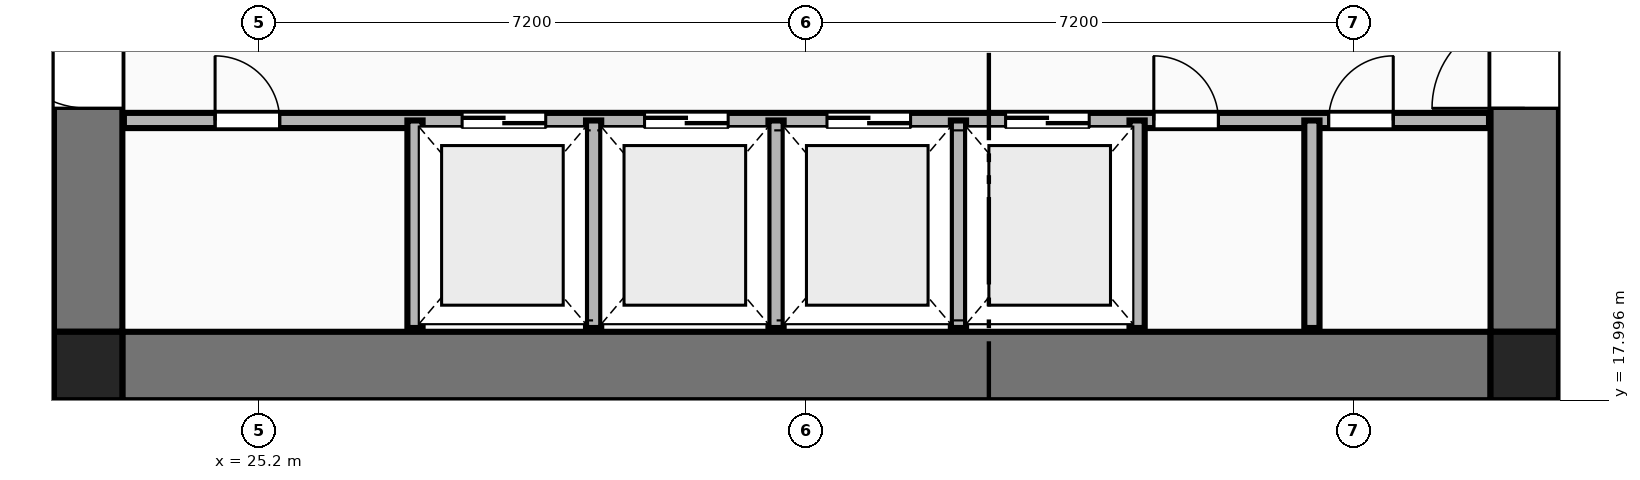
"""IFC4 building model, lengths in metres.
Left out: names, types, materials, properties, quantities, classifications, styles, units other than length and angle.
Written with IfcOpenShell. Run it as: python <this file> out.ifc"""

import sys

from ifc_helpers import new_model, si_unit, direction, frame, frame_2d, origin, origin_2d, place, context, subcontext, project, spatial, rectangle, extrude, element, fill, save


model = new_model("IFC4")
c1 = context("Model", 3, precision=1e-05, world=origin(), true_north=direction((0.0, 1.0)))
c2 = subcontext(c1, "Body", "Model", "MODEL_VIEW")
j1 = project(units=[si_unit("LENGTHUNIT", "METRE"), si_unit("PLANEANGLEUNIT", "RADIAN")], contexts=[c1])
p1 = place(None, origin())
s1 = spatial("IfcSite", under=j1, at=p1, CompositionType="ELEMENT")
p2 = place(p1, origin())
s2 = spatial("IfcBuilding", under=s1, at=p2, CompositionType="ELEMENT")
p3 = place(p2, frame((0.0, 0.0, 15.0)))
s3 = spatial("IfcBuildingStorey", under=s2, at=p3, CompositionType="ELEMENT", Elevation=15.0)
for number, where, z_axis, x_axis in (
    (1, (22.95, 18.45, 0.0), (0.0, 0.0, 1.0), (1.0, 0.0, 0.0)),
    (2, (41.85, 18.45, 0.0), (0.0, 0.0, 1.0), (1.0, 0.0, 0.0)),
):
    element("IfcColumn", number, at=place(p3, frame(where, z_axis=z_axis, x_axis=x_axis)), inside=s3, PredefinedType="COLUMN", context=c2, shape_type="SweptSolid", body=[
        extrude(rectangle(XDim=0.9, YDim=0.9, at=origin_2d()), origin(), (0.0, 0.0, 1.0), 4.5),
    ])
p4 = place(p3, frame((23.4, 18.45, 0.0), z_axis=(0.0, 0.0, 1.0), x_axis=(1.0, 0.0, 0.0)))
e3 = element("IfcWall", 3, at=p4, inside=s3, PredefinedType="SHEAR", context=c2, shape_type="SweptSolid", body=[
    extrude(rectangle(XDim=18.0, YDim=0.9, at=frame_2d((9.0, 0.0))), origin(), (0.0, 0.0, 1.0), 4.22),
])
p5 = place(p3, frame((22.95, 18.9, 0.0), z_axis=(0.0, 0.0, 1.0), x_axis=(0.0, 1.0, 0.0)))
e4 = element("IfcWall", 4, at=p5, inside=s3, PredefinedType="SHEAR", context=c2, shape_type="SweptSolid", body=[
    extrude(rectangle(XDim=14.0, YDim=0.9, at=frame_2d((7.0, 0.0))), origin(), (0.0, 0.0, 1.0), 4.22),
])
p6 = place(p5, frame((2.94, 0.0, 0.0)))
e5 = element("IfcOpeningElement", 5, at=p6, cuts=e4, PredefinedType="OPENING", context=c2, shape_type="SweptSolid", body=[
    extrude(rectangle(XDim=1.22, YDim=2.25, at=frame_2d((0.61, 1.125))), frame((0.0, 0.46, 0.0), z_axis=(0.0, -1.0, 0.0), x_axis=(1.0, 0.0, 0.0)), (0.0, 0.0, 1.0), 0.92),
])
p7 = place(p3, frame((41.85, 18.9, 0.0), z_axis=(0.0, 0.0, 1.0), x_axis=(0.0, 1.0, 0.0)))
e6 = element("IfcWall", 6, at=p7, inside=s3, PredefinedType="SHEAR", context=c2, shape_type="SweptSolid", body=[
    extrude(rectangle(XDim=14.0, YDim=0.9, at=frame_2d((7.0, 0.0))), origin(), (0.0, 0.0, 1.0), 4.22),
])
p8 = place(p7, frame((2.94, 0.0, 0.0)))
e7 = element("IfcOpeningElement", 7, at=p8, cuts=e6, PredefinedType="OPENING", context=c2, shape_type="SweptSolid", body=[
    extrude(rectangle(XDim=1.22, YDim=2.25, at=frame_2d((0.61, 1.125))), frame((0.0, 0.46, 0.0), z_axis=(0.0, -1.0, 0.0), x_axis=(1.0, 0.0, 0.0)), (0.0, 0.0, 1.0), 0.92),
])
p9 = place(p3, frame((23.42, 21.68, 0.0), z_axis=(0.0, 0.0, 1.0), x_axis=(1.0, 0.0, 0.0)))
e8 = element("IfcWall", 8, at=p9, inside=s3, PredefinedType="PLUMBINGWALL", context=c2, shape_type="SweptSolid", body=[
    extrude(rectangle(XDim=17.96, YDim=0.2, at=frame_2d((8.98, 0.0))), origin(), (0.0, 0.0, 1.0), 4.22),
])
p10 = place(p9, frame((4.45, 0.0, 0.0)))
e9 = element("IfcOpeningElement", 9, at=p10, cuts=e8, PredefinedType="OPENING", context=c2, shape_type="SweptSolid", body=[
    extrude(rectangle(XDim=1.1, YDim=2.2, at=frame_2d((0.55, 1.1))), frame((0.0, 0.11, 0.0), z_axis=(0.0, -1.0, 0.0), x_axis=(1.0, 0.0, 0.0)), (0.0, 0.0, 1.0), 0.22),
])
p11 = place(p9, frame((6.85, 0.0, 0.0)))
e10 = element("IfcOpeningElement", 10, at=p11, cuts=e8, PredefinedType="OPENING", context=c2, shape_type="SweptSolid", body=[
    extrude(rectangle(XDim=1.1, YDim=2.2, at=frame_2d((0.55, 1.1))), frame((0.0, 0.11, 0.0), z_axis=(0.0, -1.0, 0.0), x_axis=(1.0, 0.0, 0.0)), (0.0, 0.0, 1.0), 0.22),
])
p12 = place(p9, frame((9.25, 0.0, 0.0)))
e11 = element("IfcOpeningElement", 11, at=p12, cuts=e8, PredefinedType="OPENING", context=c2, shape_type="SweptSolid", body=[
    extrude(rectangle(XDim=1.1, YDim=2.2, at=frame_2d((0.55, 1.1))), frame((0.0, 0.11, 0.0), z_axis=(0.0, -1.0, 0.0), x_axis=(1.0, 0.0, 0.0)), (0.0, 0.0, 1.0), 0.22),
])
p13 = place(p9, frame((11.6, 0.0, 0.0)))
e12 = element("IfcOpeningElement", 12, at=p13, cuts=e8, PredefinedType="OPENING", context=c2, shape_type="SweptSolid", body=[
    extrude(rectangle(XDim=1.1, YDim=2.2, at=frame_2d((0.55, 1.1))), frame((0.0, 0.11, 0.0), z_axis=(0.0, -1.0, 0.0), x_axis=(1.0, 0.0, 0.0)), (0.0, 0.0, 1.0), 0.22),
])
p14 = place(p9, frame((1.2, 0.0, 0.0)))
e13 = element("IfcOpeningElement", 13, at=p14, cuts=e8, PredefinedType="OPENING", context=c2, shape_type="SweptSolid", body=[
    extrude(rectangle(XDim=0.85, YDim=2.05, at=frame_2d((0.425, 1.025))), frame((0.0, 0.11, 0.0), z_axis=(0.0, -1.0, 0.0), x_axis=(1.0, 0.0, 0.0)), (0.0, 0.0, 1.0), 0.22),
])
p15 = place(p9, frame((13.55, 0.0, 0.0)))
e14 = element("IfcOpeningElement", 14, at=p15, cuts=e8, PredefinedType="OPENING", context=c2, shape_type="SweptSolid", body=[
    extrude(rectangle(XDim=0.85, YDim=2.05, at=frame_2d((0.425, 1.025))), frame((0.0, 0.11, 0.0), z_axis=(0.0, -1.0, 0.0), x_axis=(1.0, 0.0, 0.0)), (0.0, 0.0, 1.0), 0.22),
])
p16 = place(p9, frame((15.85, 0.0, 0.0)))
e15 = element("IfcOpeningElement", 15, at=p16, cuts=e8, PredefinedType="OPENING", context=c2, shape_type="SweptSolid", body=[
    extrude(rectangle(XDim=0.85, YDim=2.05, at=frame_2d((0.425, 1.025))), frame((0.0, 0.11, 0.0), z_axis=(0.0, -1.0, 0.0), x_axis=(1.0, 0.0, 0.0)), (0.0, 0.0, 1.0), 0.22),
])
for number, where, z_axis, x_axis in (
    (16, (27.25, 18.95, 0.0), (0.0, 0.0, 1.0), (0.0, 1.0, 0.0)),
    (17, (29.6, 18.95, 0.0), (0.0, 0.0, 1.0), (0.0, 1.0, 0.0)),
    (18, (32.0, 18.95, 0.0), (0.0, 0.0, 1.0), (0.0, 1.0, 0.0)),
    (19, (34.4, 18.95, 0.0), (0.0, 0.0, 1.0), (0.0, 1.0, 0.0)),
    (20, (36.75, 18.95, 0.0), (0.0, 0.0, 1.0), (0.0, 1.0, 0.0)),
    (21, (39.05, 18.95, 0.0), (0.0, 0.0, 1.0), (0.0, 1.0, 0.0)),
):
    element("IfcWall", number, at=place(p3, frame(where, z_axis=z_axis, x_axis=x_axis)), inside=s3, PredefinedType="PLUMBINGWALL", context=c2, shape_type="SweptSolid", body=[
        extrude(rectangle(XDim=2.73, YDim=0.2, at=frame_2d((1.365, 0.0))), origin(), (0.0, 0.0, 1.0), 4.22),
    ])
p17 = place(p6, origin())
e22 = element("IfcDoor", 22, at=p17, inside=s3, OperationType="SINGLE_SWING_RIGHT", PredefinedType="DOOR", context=c2, shape_type="SweptSolid", body=[
    extrude(rectangle(XDim=1.22, YDim=2.25, at=frame_2d((0.61, 1.125))), frame((0.0, 0.025, 0.0), z_axis=(0.0, -1.0, 0.0), x_axis=(1.0, 0.0, 0.0)), (0.0, 0.0, 1.0), 0.05),
])
fill(e5, e22)
p18 = place(p8, origin())
e23 = element("IfcDoor", 23, at=p18, inside=s3, OperationType="SINGLE_SWING_LEFT", PredefinedType="DOOR", context=c2, shape_type="SweptSolid", body=[
    extrude(rectangle(XDim=1.22, YDim=2.25, at=frame_2d((0.61, 1.125))), frame((0.0, 0.025, 0.0), z_axis=(0.0, -1.0, 0.0), x_axis=(1.0, 0.0, 0.0)), (0.0, 0.0, 1.0), 0.05),
])
fill(e7, e23)
p19 = place(p10, origin())
e24 = element("IfcDoor", 24, at=p19, inside=s3, OperationType="DOUBLE_DOOR_SLIDING", PredefinedType="DOOR", context=c2, shape_type="SweptSolid", body=[
    extrude(rectangle(XDim=1.1, YDim=2.2, at=frame_2d((0.55, 1.1))), frame((0.0, 0.025, 0.0), z_axis=(0.0, -1.0, 0.0), x_axis=(1.0, 0.0, 0.0)), (0.0, 0.0, 1.0), 0.05),
])
fill(e9, e24)
p20 = place(p11, origin())
e25 = element("IfcDoor", 25, at=p20, inside=s3, OperationType="DOUBLE_DOOR_SLIDING", PredefinedType="DOOR", context=c2, shape_type="SweptSolid", body=[
    extrude(rectangle(XDim=1.1, YDim=2.2, at=frame_2d((0.55, 1.1))), frame((0.0, 0.025, 0.0), z_axis=(0.0, -1.0, 0.0), x_axis=(1.0, 0.0, 0.0)), (0.0, 0.0, 1.0), 0.05),
])
fill(e10, e25)
p21 = place(p12, origin())
e26 = element("IfcDoor", 26, at=p21, inside=s3, OperationType="DOUBLE_DOOR_SLIDING", PredefinedType="DOOR", context=c2, shape_type="SweptSolid", body=[
    extrude(rectangle(XDim=1.1, YDim=2.2, at=frame_2d((0.55, 1.1))), frame((0.0, 0.025, 0.0), z_axis=(0.0, -1.0, 0.0), x_axis=(1.0, 0.0, 0.0)), (0.0, 0.0, 1.0), 0.05),
])
fill(e11, e26)
p22 = place(p13, origin())
e27 = element("IfcDoor", 27, at=p22, inside=s3, OperationType="DOUBLE_DOOR_SLIDING", PredefinedType="DOOR", context=c2, shape_type="SweptSolid", body=[
    extrude(rectangle(XDim=1.1, YDim=2.2, at=frame_2d((0.55, 1.1))), frame((0.0, 0.025, 0.0), z_axis=(0.0, -1.0, 0.0), x_axis=(1.0, 0.0, 0.0)), (0.0, 0.0, 1.0), 0.05),
])
fill(e12, e27)
p23 = place(p14, origin())
e28 = element("IfcDoor", 28, at=p23, inside=s3, OperationType="SINGLE_SWING_LEFT", PredefinedType="DOOR", context=c2, shape_type="SweptSolid", body=[
    extrude(rectangle(XDim=0.85, YDim=2.05, at=frame_2d((0.425, 1.025))), frame((0.0, 0.025, 0.0), z_axis=(0.0, -1.0, 0.0), x_axis=(1.0, 0.0, 0.0)), (0.0, 0.0, 1.0), 0.05),
])
fill(e13, e28)
p24 = place(p15, origin())
e29 = element("IfcDoor", 29, at=p24, inside=s3, OperationType="SINGLE_SWING_LEFT", PredefinedType="DOOR", context=c2, shape_type="SweptSolid", body=[
    extrude(rectangle(XDim=0.85, YDim=2.05, at=frame_2d((0.425, 1.025))), frame((0.0, 0.025, 0.0), z_axis=(0.0, -1.0, 0.0), x_axis=(1.0, 0.0, 0.0)), (0.0, 0.0, 1.0), 0.05),
])
fill(e14, e29)
p25 = place(p16, origin())
e30 = element("IfcDoor", 30, at=p25, inside=s3, OperationType="SINGLE_SWING_RIGHT", PredefinedType="DOOR", context=c2, shape_type="SweptSolid", body=[
    extrude(rectangle(XDim=0.85, YDim=2.05, at=frame_2d((0.425, 1.025))), frame((0.0, 0.025, 0.0), z_axis=(0.0, -1.0, 0.0), x_axis=(1.0, 0.0, 0.0)), (0.0, 0.0, 1.0), 0.05),
])
fill(e15, e30)
save(model, sys.argv[1])
